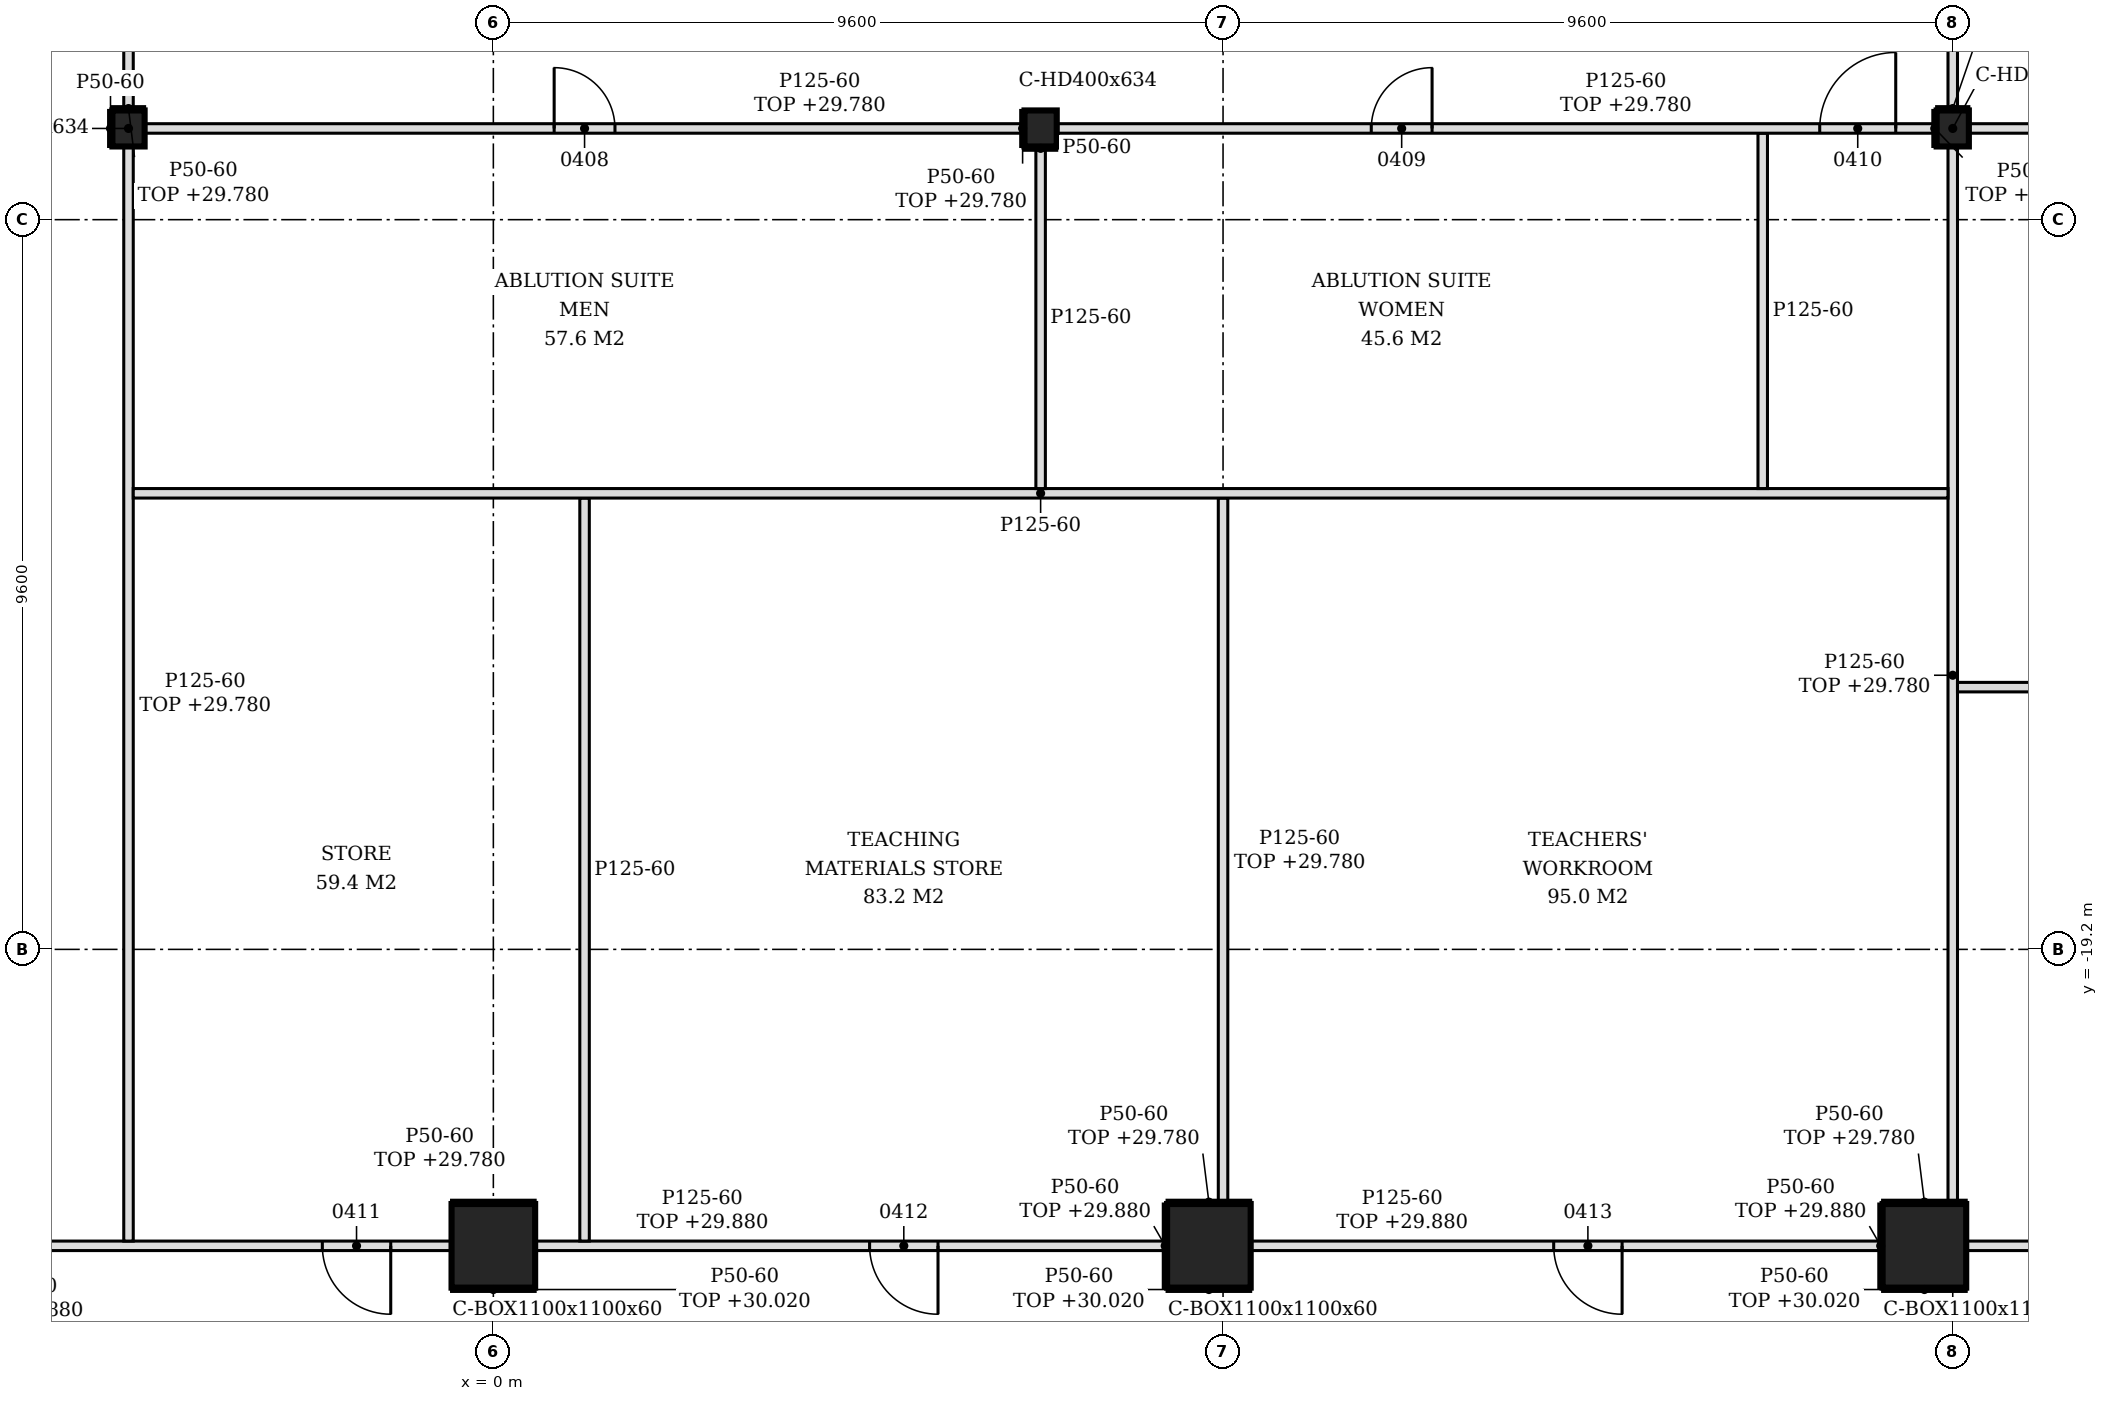
"""IFC4 building model, lengths in metres.
Left out: names, types, materials, properties, quantities, classifications, styles, units other than length and angle.
Written with IfcOpenShell. Run it as: python <this file> out.ifc"""

import sys

from ifc_helpers import new_model, si_unit, direction, frame, frame_2d, origin, origin_2d, place, context, subcontext, project, spatial, polyline, rectangle, hollow_rectangle, i_section, outline, extrude, element, fill, save


model = new_model("IFC4")
c1 = context("Model", 3, precision=1e-05, world=origin(), true_north=direction((0.0, 1.0)))
c2 = subcontext(c1, "Body", "Model", "MODEL_VIEW")
j1 = project(units=[si_unit("LENGTHUNIT", "METRE"), si_unit("PLANEANGLEUNIT", "RADIAN")], contexts=[c1])
p1 = place(None, origin())
s1 = spatial("IfcSite", under=j1, at=p1, CompositionType="ELEMENT")
p2 = place(p1, origin())
s2 = spatial("IfcBuilding", under=s1, at=p2, CompositionType="ELEMENT")
p3 = place(p2, frame((0.0, 0.0, 25.8)))
s3 = spatial("IfcBuildingStorey", under=s2, at=p3, CompositionType="ELEMENT", Elevation=25.8)
for number, where, z_axis, x_axis in (
    (1, (0.0, -23.1, -0.2), (0.0, 0.0, 1.0), (1.0, 0.0, 0.0)),
    (2, (9.414, -23.1, -0.2), (0.0, 0.0, 1.0), (1.0, 0.0, 0.0)),
    (3, (18.827, -23.1, -0.2), (0.0, 0.0, 1.0), (1.0, 0.0, 0.0)),
):
    element("IfcColumn", number, at=place(p3, frame(where, z_axis=z_axis, x_axis=x_axis)), inside=s3, PredefinedType="COLUMN", context=c2, shape_type="SweptSolid", body=[
        extrude(hollow_rectangle(XDim=1.1, YDim=1.1, WallThickness=0.06, at=origin_2d()), origin(), (0.0, 0.0, 1.0), 4.8),
    ])
for number, where, z_axis, x_axis in (
    (4, (-4.8, -8.4, -0.2), (0.0, 0.0, 1.0), (1.0, 0.0, 0.0)),
    (5, (7.2, -8.4, -0.2), (0.0, 0.0, 1.0), (1.0, 0.0, 0.0)),
    (6, (19.2, -8.4, -0.2), (0.0, 0.0, 1.0), (1.0, 0.0, 0.0)),
):
    element("IfcColumn", number, at=place(p3, frame(where, z_axis=z_axis, x_axis=x_axis)), inside=s3, PredefinedType="COLUMN", context=c2, shape_type="SweptSolid", body=[
        extrude(i_section(OverallWidth=0.424, OverallDepth=0.474, WebThickness=0.048, FlangeThickness=0.077, FilletRadius=0.015, at=origin_2d()), origin(), (0.0, 0.0, 1.0), 4.8),
    ])
p4 = place(p3, frame((-8.864, -23.1, 0.0), z_axis=(0.0, 0.0, 1.0), x_axis=(1.0, 0.0, 0.0)))
e7 = element("IfcWall", 7, at=p4, inside=s3, PredefinedType="PARTITIONING", context=c2, shape_type="SweptSolid", body=[
    extrude(rectangle(XDim=8.313, YDim=0.125, at=frame_2d((4.157, 0.0))), origin(), (0.0, 0.0, 1.0), 4.08),
])
p5 = place(p4, frame((6.614, 0.0, 0.0)))
e8 = element("IfcOpeningElement", 8, at=p5, cuts=e7, PredefinedType="OPENING", context=c2, shape_type="SweptSolid", body=[
    extrude(rectangle(XDim=0.9, YDim=2.1, at=frame_2d((0.45, 1.05))), frame((0.0, 0.073, 0.0), z_axis=(0.0, -1.0, 0.0), x_axis=(1.0, 0.0, 0.0)), (0.0, 0.0, 1.0), 0.145),
])
p6 = place(p3, frame((0.55, -23.1, 0.0), z_axis=(0.0, 0.0, 1.0), x_axis=(1.0, 0.0, 0.0)))
e9 = element("IfcWall", 9, at=p6, inside=s3, PredefinedType="PARTITIONING", context=c2, shape_type="SweptSolid", body=[
    extrude(rectangle(XDim=8.313, YDim=0.125, at=frame_2d((4.157, 0.0))), origin(), (0.0, 0.0, 1.0), 4.08),
])
p7 = place(p6, frame((4.4, 0.0, 0.0)))
e10 = element("IfcOpeningElement", 10, at=p7, cuts=e9, PredefinedType="OPENING", context=c2, shape_type="SweptSolid", body=[
    extrude(rectangle(XDim=0.9, YDim=2.1, at=frame_2d((0.45, 1.05))), frame((0.0, 0.073, 0.0), z_axis=(0.0, -1.0, 0.0), x_axis=(1.0, 0.0, 0.0)), (0.0, 0.0, 1.0), 0.145),
])
p8 = place(p3, frame((9.964, -23.1, 0.0), z_axis=(0.0, 0.0, 1.0), x_axis=(1.0, 0.0, 0.0)))
e11 = element("IfcWall", 11, at=p8, inside=s3, PredefinedType="PARTITIONING", context=c2, shape_type="SweptSolid", body=[
    extrude(rectangle(XDim=8.313, YDim=0.125, at=frame_2d((4.157, 0.0))), origin(), (0.0, 0.0, 1.0), 4.08),
])
p9 = place(p8, frame((3.986, 0.0, 0.0)))
e12 = element("IfcOpeningElement", 12, at=p9, cuts=e11, PredefinedType="OPENING", context=c2, shape_type="SweptSolid", body=[
    extrude(rectangle(XDim=0.9, YDim=2.1, at=frame_2d((0.45, 1.05))), frame((0.0, 0.073, 0.0), z_axis=(0.0, -1.0, 0.0), x_axis=(1.0, 0.0, 0.0)), (0.0, 0.0, 1.0), 0.145),
])
p10 = place(p3, frame((19.377, -23.1, 0.0), z_axis=(0.0, 0.0, 1.0), x_axis=(1.0, 0.0, 0.0)))
e13 = element("IfcWall", 13, at=p10, inside=s3, PredefinedType="PARTITIONING", context=c2, shape_type="SweptSolid", body=[
    extrude(rectangle(XDim=8.585, YDim=0.125, at=frame_2d((4.292, 0.0))), origin(), (0.0, 0.0, 1.0), 4.6),
])
p11 = place(p3, frame((-4.8, -23.038, 0.0), z_axis=(0.0, 0.0, 1.0), x_axis=(0.0, 1.0, 0.0)))
e14 = element("IfcWall", 14, at=p11, inside=s3, PredefinedType="PARTITIONING", context=c2, shape_type="SweptSolid", body=[
    extrude(rectangle(XDim=14.401, YDim=0.125, at=frame_2d((7.2, 0.0))), origin(), (0.0, 0.0, 1.0), 3.98),
])
p12 = place(p3, frame((1.2, -23.038, 0.0), z_axis=(0.0, 0.0, 1.0), x_axis=(0.0, 1.0, 0.0)))
e15 = element("IfcWall", 15, at=p12, inside=s3, PredefinedType="PARTITIONING", context=c2, shape_type="SweptSolid", body=[
    extrude(outline(polyline([(0.0, 0.0), (9.775, 0.0), (9.775, 4.6), (0.087, 4.6), (0.085, 4.08), (0.0, 4.08), (0.0, 0.0)])), frame((0.0, 0.062, 0.0), z_axis=(0.0, -1.0, 0.0), x_axis=(1.0, 0.0, 0.0)), (0.0, 0.0, 1.0), 0.125),
])
p13 = place(p3, frame((9.6, -22.55, 0.0), z_axis=(0.0, 0.0, 1.0), x_axis=(0.0, 1.0, 0.0)))
e16 = element("IfcWall", 16, at=p13, inside=s3, PredefinedType="PARTITIONING", context=c2, shape_type="SweptSolid", body=[
    extrude(rectangle(XDim=9.288, YDim=0.125, at=frame_2d((4.644, 0.0))), origin(), (0.0, 0.0, 1.0), 3.98),
])
p14 = place(p3, frame((19.2, -22.55, 0.0), z_axis=(0.0, 0.0, 1.0), x_axis=(0.0, 1.0, 0.0)))
e17 = element("IfcWall", 17, at=p14, inside=s3, PredefinedType="PARTITIONING", context=c2, shape_type="SweptSolid", body=[
    extrude(rectangle(XDim=13.913, YDim=0.125, at=frame_2d((6.957, 0.0))), origin(), (0.0, 0.0, 1.0), 3.98),
])
p15 = place(p3, frame((19.262, -15.75, 0.0), z_axis=(0.0, 0.0, 1.0), x_axis=(1.0, 0.0, 0.0)))
e18 = element("IfcWall", 18, at=p15, inside=s3, PredefinedType="PARTITIONING", context=c2, shape_type="SweptSolid", body=[
    extrude(outline(polyline([(0.0, 0.0), (8.575, 0.0), (8.575, 4.6), (7.189, 4.6), (7.187, 4.08), (6.64, 4.08), (6.638, 4.6), (0.087, 4.6), (0.085, 3.98), (0.0, 3.98), (0.0, 0.0)])), frame((0.0, 0.062, 0.0), z_axis=(0.0, -1.0, 0.0), x_axis=(1.0, 0.0, 0.0)), (0.0, 0.0, 1.0), 0.125),
])
p16 = place(p3, frame((-4.738, -13.2, 0.0), z_axis=(0.0, 0.0, 1.0), x_axis=(1.0, 0.0, 0.0)))
e19 = element("IfcWall", 19, at=p16, inside=s3, PredefinedType="PARTITIONING", context=c2, shape_type="SweptSolid", body=[
    extrude(outline(polyline([(0.0, 0.0), (23.875, 0.0), (23.875, 3.98), (23.788, 3.98), (23.785, 4.6), (19.288, 4.6), (19.285, 3.98), (18.988, 3.98), (18.986, 4.6), (14.488, 4.6), (14.486, 3.98), (14.188, 3.98), (14.186, 4.6), (9.688, 4.6), (9.686, 3.98), (9.387, 3.98), (9.385, 4.6), (4.887, 4.6), (4.885, 3.98), (4.587, 3.98), (4.585, 4.6), (0.087, 4.6), (0.085, 3.98), (0.0, 3.98), (0.0, 0.0)])), frame((0.0, 0.062, 0.0), z_axis=(0.0, -1.0, 0.0), x_axis=(1.0, 0.0, 0.0)), (0.0, 0.0, 1.0), 0.125),
])
p17 = place(p3, frame((7.2, -13.137, 0.0), z_axis=(0.0, 0.0, 1.0), x_axis=(0.0, 1.0, 0.0)))
e20 = element("IfcWall", 20, at=p17, inside=s3, PredefinedType="PARTITIONING", context=c2, shape_type="SweptSolid", body=[
    extrude(rectangle(XDim=4.5, YDim=0.125, at=frame_2d((2.25, 0.0))), origin(), (0.0, 0.0, 1.0), 4.6),
])
p18 = place(p3, frame((16.7, -13.137, 0.0), z_axis=(0.0, 0.0, 1.0), x_axis=(0.0, 1.0, 0.0)))
e21 = element("IfcWall", 21, at=p18, inside=s3, PredefinedType="PARTITIONING", context=c2, shape_type="SweptSolid", body=[
    extrude(outline(polyline([(0.0, 0.0), (4.675, 0.0), (4.675, 3.98), (4.587, 3.98), (4.585, 4.6), (0.0, 4.6), (0.0, 0.0)])), frame((0.0, 0.062, 0.0), z_axis=(0.0, -1.0, 0.0), x_axis=(1.0, 0.0, 0.0)), (0.0, 0.0, 1.0), 0.125),
])
p19 = place(p3, frame((-4.588, -8.4, 0.0), z_axis=(0.0, 0.0, 1.0), x_axis=(1.0, 0.0, 0.0)))
e22 = element("IfcWall", 22, at=p19, inside=s3, PredefinedType="PARTITIONING", context=c2, shape_type="SweptSolid", body=[
    extrude(rectangle(XDim=11.576, YDim=0.125, at=frame_2d((5.788, 0.0))), origin(), (0.0, 0.0, 1.0), 3.98),
])
p20 = place(p19, frame((5.388, 0.0, 0.0)))
e23 = element("IfcOpeningElement", 23, at=p20, cuts=e22, PredefinedType="OPENING", context=c2, shape_type="SweptSolid", body=[
    extrude(rectangle(XDim=0.8, YDim=2.1, at=frame_2d((0.4, 1.05))), frame((0.0, 0.073, 0.0), z_axis=(0.0, -1.0, 0.0), x_axis=(1.0, 0.0, 0.0)), (0.0, 0.0, 1.0), 0.145),
])
p21 = place(p3, frame((7.412, -8.4, 0.0), z_axis=(0.0, 0.0, 1.0), x_axis=(1.0, 0.0, 0.0)))
e24 = element("IfcWall", 24, at=p21, inside=s3, PredefinedType="PARTITIONING", context=c2, shape_type="SweptSolid", body=[
    extrude(rectangle(XDim=11.576, YDim=0.125, at=frame_2d((5.788, 0.0))), origin(), (0.0, 0.0, 1.0), 3.98),
])
p22 = place(p21, frame((4.138, 0.0, 0.0)))
e25 = element("IfcOpeningElement", 25, at=p22, cuts=e24, PredefinedType="OPENING", context=c2, shape_type="SweptSolid", body=[
    extrude(rectangle(XDim=0.8, YDim=2.1, at=frame_2d((0.4, 1.05))), frame((0.0, 0.073, 0.0), z_axis=(0.0, -1.0, 0.0), x_axis=(1.0, 0.0, 0.0)), (0.0, 0.0, 1.0), 0.145),
])
p23 = place(p21, frame((10.038, 0.0, 0.0)))
e26 = element("IfcOpeningElement", 26, at=p23, cuts=e24, PredefinedType="OPENING", context=c2, shape_type="SweptSolid", body=[
    extrude(rectangle(XDim=1.0, YDim=2.1, at=frame_2d((0.5, 1.05))), frame((0.0, 0.073, 0.0), z_axis=(0.0, -1.0, 0.0), x_axis=(1.0, 0.0, 0.0)), (0.0, 0.0, 1.0), 0.145),
])
p24 = place(p3, frame((19.412, -8.4, 0.0), z_axis=(0.0, 0.0, 1.0), x_axis=(1.0, 0.0, 0.0)))
e27 = element("IfcWall", 27, at=p24, inside=s3, PredefinedType="PARTITIONING", context=c2, shape_type="SweptSolid", body=[
    extrude(outline(polyline([(0.0, 0.0), (8.425, 0.0), (8.426, 4.08), (8.338, 4.08), (8.336, 4.6), (0.0, 4.6), (0.0, 0.0)])), frame((0.0, 0.062, 0.0), z_axis=(0.0, -1.0, 0.0), x_axis=(1.0, 0.0, 0.0)), (0.0, 0.0, 1.0), 0.125),
])
for number, where, z_axis, x_axis in (
    (28, (-4.8, -8.163, 0.0), (0.0, 0.0, 1.0), (0.0, 1.0, 0.0)),
    (29, (19.2, -8.163, 0.0), (0.0, 0.0, 1.0), (0.0, 1.0, 0.0)),
):
    element("IfcWall", number, at=place(p3, frame(where, z_axis=z_axis, x_axis=x_axis)), inside=s3, PredefinedType="PARTITIONING", context=c2, shape_type="SweptSolid", body=[
        extrude(rectangle(XDim=10.326, YDim=0.125, at=frame_2d((5.163, 0.0))), origin(), (0.0, 0.0, 1.0), 3.98),
    ])
p25 = place(p3, frame((-0.55, -22.525, 0.0), z_axis=(0.0, 0.0, 1.0), x_axis=(1.0, 0.0, 0.0)))
e30 = element("IfcWall", 30, at=p25, inside=s3, PredefinedType="PARTITIONING", context=c2, shape_type="SweptSolid", body=[
    extrude(rectangle(XDim=1.1, YDim=0.05, at=frame_2d((0.55, 0.0))), origin(), (0.0, 0.0, 1.0), 3.98),
])
p26 = place(p3, frame((-0.55, -23.675, 0.0), z_axis=(0.0, 0.0, 1.0), x_axis=(1.0, 0.0, 0.0)))
e31 = element("IfcWall", 31, at=p26, inside=s3, PredefinedType="PARTITIONING", context=c2, shape_type="SweptSolid", body=[
    extrude(rectangle(XDim=1.1, YDim=0.05, at=frame_2d((0.55, 0.0))), origin(), (0.0, 0.0, 1.0), 4.22),
])
p27 = place(p3, frame((8.864, -22.525, 0.0), z_axis=(0.0, 0.0, 1.0), x_axis=(1.0, 0.0, 0.0)))
e32 = element("IfcWall", 32, at=p27, inside=s3, PredefinedType="PARTITIONING", context=c2, shape_type="SweptSolid", body=[
    extrude(rectangle(XDim=1.1, YDim=0.05, at=frame_2d((0.55, 0.0))), origin(), (0.0, 0.0, 1.0), 3.98),
])
p28 = place(p3, frame((8.864, -23.675, 0.0), z_axis=(0.0, 0.0, 1.0), x_axis=(1.0, 0.0, 0.0)))
e33 = element("IfcWall", 33, at=p28, inside=s3, PredefinedType="PARTITIONING", context=c2, shape_type="SweptSolid", body=[
    extrude(rectangle(XDim=1.1, YDim=0.05, at=frame_2d((0.55, 0.0))), origin(), (0.0, 0.0, 1.0), 4.22),
])
p29 = place(p3, frame((18.277, -22.525, 0.0), z_axis=(0.0, 0.0, 1.0), x_axis=(1.0, 0.0, 0.0)))
e34 = element("IfcWall", 34, at=p29, inside=s3, PredefinedType="PARTITIONING", context=c2, shape_type="SweptSolid", body=[
    extrude(rectangle(XDim=1.1, YDim=0.05, at=frame_2d((0.55, 0.0))), origin(), (0.0, 0.0, 1.0), 3.98),
])
p30 = place(p3, frame((18.277, -23.675, 0.0), z_axis=(0.0, 0.0, 1.0), x_axis=(1.0, 0.0, 0.0)))
e35 = element("IfcWall", 35, at=p30, inside=s3, PredefinedType="PARTITIONING", context=c2, shape_type="SweptSolid", body=[
    extrude(rectangle(XDim=1.1, YDim=0.05, at=frame_2d((0.55, 0.0))), origin(), (0.0, 0.0, 1.0), 4.22),
])
p31 = place(p3, frame((-5.037, -8.637, 0.0), z_axis=(0.0, 0.0, 1.0), x_axis=(0.0, 1.0, 0.0)))
e36 = element("IfcWall", 36, at=p31, inside=s3, PredefinedType="PARTITIONING", context=c2, shape_type="SweptSolid", body=[
    extrude(rectangle(XDim=0.474, YDim=0.05, at=frame_2d((0.237, 0.0))), origin(), (0.0, 0.0, 1.0), 4.6),
])
for number, where, z_axis, x_axis in (
    (37, (8.839, -23.65, 0.0), (0.0, 0.0, 1.0), (0.0, 1.0, 0.0)),
    (38, (18.252, -23.65, 0.0), (0.0, 0.0, 1.0), (0.0, 1.0, 0.0)),
):
    element("IfcWall", number, at=place(p3, frame(where, z_axis=z_axis, x_axis=x_axis)), inside=s3, PredefinedType="PARTITIONING", context=c2, shape_type="SweptSolid", body=[
        extrude(rectangle(XDim=1.1, YDim=0.05, at=frame_2d((0.55, 0.0))), origin(), (0.0, 0.0, 1.0), 4.08),
    ])
for number, where, z_axis, x_axis in (
    (39, (18.963, -8.637, 0.0), (0.0, 0.0, 1.0), (0.0, 1.0, 0.0)),
    (40, (6.963, -8.637, 0.0), (0.0, 0.0, 1.0), (0.0, 1.0, 0.0)),
):
    element("IfcWall", number, at=place(p3, frame(where, z_axis=z_axis, x_axis=x_axis)), inside=s3, PredefinedType="PARTITIONING", context=c2, shape_type="SweptSolid", body=[
        extrude(rectangle(XDim=0.474, YDim=0.05, at=frame_2d((0.237, 0.0))), origin(), (0.0, 0.0, 1.0), 3.98),
    ])
p32 = place(p3, frame((-5.012, -8.138, 0.0), z_axis=(0.0, 0.0, 1.0), x_axis=(1.0, 0.0, 0.0)))
e41 = element("IfcWall", 41, at=p32, inside=s3, PredefinedType="PARTITIONING", context=c2, shape_type="SweptSolid", body=[
    extrude(rectangle(XDim=0.424, YDim=0.05, at=frame_2d((0.212, 0.0))), origin(), (0.0, 0.0, 1.0), 3.98),
])
p33 = place(p3, frame((6.988, -8.662, 0.0), z_axis=(0.0, 0.0, 1.0), x_axis=(1.0, 0.0, 0.0)))
e42 = element("IfcWall", 42, at=p33, inside=s3, PredefinedType="PARTITIONING", context=c2, shape_type="SweptSolid", body=[
    extrude(rectangle(XDim=0.424, YDim=0.05, at=frame_2d((0.212, 0.0))), origin(), (0.0, 0.0, 1.0), 4.6),
])
p34 = place(p3, frame((18.988, -8.138, 0.0), z_axis=(0.0, 0.0, 1.0), x_axis=(1.0, 0.0, 0.0)))
e43 = element("IfcWall", 43, at=p34, inside=s3, PredefinedType="PARTITIONING", context=c2, shape_type="SweptSolid", body=[
    extrude(rectangle(XDim=0.424, YDim=0.05, at=frame_2d((0.212, 0.0))), origin(), (0.0, 0.0, 1.0), 3.98),
])
p35 = place(p20, origin())
e44 = element("IfcDoor", 44, at=p35, inside=s3, OperationType="SINGLE_SWING_LEFT", PredefinedType="DOOR", context=c2, shape_type="SweptSolid", body=[
    extrude(rectangle(XDim=0.8, YDim=2.1, at=frame_2d((0.4, 1.05))), frame((0.0, 0.025, 0.0), z_axis=(0.0, -1.0, 0.0), x_axis=(1.0, 0.0, 0.0)), (0.0, 0.0, 1.0), 0.05),
])
fill(e23, e44)
p36 = place(p22, origin())
e45 = element("IfcDoor", 45, at=p36, inside=s3, OperationType="SINGLE_SWING_RIGHT", PredefinedType="DOOR", context=c2, shape_type="SweptSolid", body=[
    extrude(rectangle(XDim=0.8, YDim=2.1, at=frame_2d((0.4, 1.05))), frame((0.0, 0.025, 0.0), z_axis=(0.0, -1.0, 0.0), x_axis=(1.0, 0.0, 0.0)), (0.0, 0.0, 1.0), 0.05),
])
fill(e25, e45)
p37 = place(p23, origin())
e46 = element("IfcDoor", 46, at=p37, inside=s3, OperationType="SINGLE_SWING_RIGHT", PredefinedType="DOOR", context=c2, shape_type="SweptSolid", body=[
    extrude(rectangle(XDim=1.0, YDim=2.1, at=frame_2d((0.5, 1.05))), frame((0.0, 0.025, 0.0), z_axis=(0.0, -1.0, 0.0), x_axis=(1.0, 0.0, 0.0)), (0.0, 0.0, 1.0), 0.05),
])
fill(e26, e46)
p38 = place(p5, frame((0.9, 0.0, 0.0), z_axis=(0.0, 0.0, 1.0), x_axis=(-1.0, 0.0, 0.0)))
e47 = element("IfcDoor", 47, at=p38, inside=s3, OperationType="SINGLE_SWING_LEFT", PredefinedType="DOOR", context=c2, shape_type="SweptSolid", body=[
    extrude(rectangle(XDim=0.9, YDim=2.1, at=frame_2d((0.45, 1.05))), frame((0.0, 0.025, 0.0), z_axis=(0.0, -1.0, 0.0), x_axis=(1.0, 0.0, 0.0)), (0.0, 0.0, 1.0), 0.05),
])
fill(e8, e47)
p39 = place(p7, frame((0.9, 0.0, 0.0), z_axis=(0.0, 0.0, 1.0), x_axis=(-1.0, 0.0, 0.0)))
e48 = element("IfcDoor", 48, at=p39, inside=s3, OperationType="SINGLE_SWING_LEFT", PredefinedType="DOOR", context=c2, shape_type="SweptSolid", body=[
    extrude(rectangle(XDim=0.9, YDim=2.1, at=frame_2d((0.45, 1.05))), frame((0.0, 0.025, 0.0), z_axis=(0.0, -1.0, 0.0), x_axis=(1.0, 0.0, 0.0)), (0.0, 0.0, 1.0), 0.05),
])
fill(e10, e48)
p40 = place(p9, frame((0.9, 0.0, 0.0), z_axis=(0.0, 0.0, 1.0), x_axis=(-1.0, 0.0, 0.0)))
e49 = element("IfcDoor", 49, at=p40, inside=s3, OperationType="SINGLE_SWING_LEFT", PredefinedType="DOOR", context=c2, shape_type="SweptSolid", body=[
    extrude(rectangle(XDim=0.9, YDim=2.1, at=frame_2d((0.45, 1.05))), frame((0.0, 0.025, 0.0), z_axis=(0.0, -1.0, 0.0), x_axis=(1.0, 0.0, 0.0)), (0.0, 0.0, 1.0), 0.05),
])
fill(e12, e49)
save(model, sys.argv[1])
